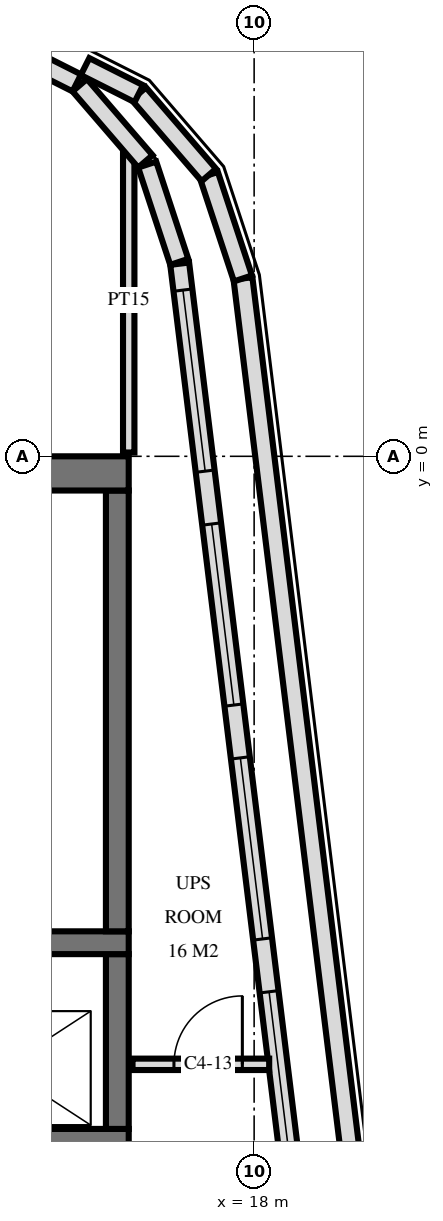
"""IFC4 building model, lengths in metres.
Left out: names, types, materials, properties, quantities, classifications, styles, units other than length and angle.
Written with IfcOpenShell. Run it as: python <this file> out.ifc"""

import sys

from ifc_helpers import new_model, si_unit, direction, frame, frame_2d, origin, place, context, subcontext, project, spatial, rectangle, extrude, element, fill, save


model = new_model("IFC4")
c1 = context("Model", 3, precision=1e-05, world=origin(), true_north=direction((0.0, 1.0)))
c2 = subcontext(c1, "Body", "Model", "MODEL_VIEW")
j1 = project(units=[si_unit("LENGTHUNIT", "METRE"), si_unit("PLANEANGLEUNIT", "RADIAN")], contexts=[c1])
p1 = place(None, origin())
s1 = spatial("IfcSite", under=j1, at=p1, CompositionType="ELEMENT")
p2 = place(p1, origin())
s2 = spatial("IfcBuilding", under=s1, at=p2, CompositionType="ELEMENT")
p3 = place(p2, frame((0.0, 0.0, 357.4)))
s3 = spatial("IfcBuildingStorey", under=s2, at=p3, CompositionType="ELEMENT", Elevation=357.4)
p4 = place(p3, frame((10.0, -0.225, 0.0), z_axis=(0.0, 0.0, 1.0), x_axis=(1.0, 0.0, 0.0)))
e1 = element("IfcWall", 1, at=p4, inside=s3, PredefinedType="SHEAR", context=c2, shape_type="SweptSolid", body=[
    extrude(rectangle(XDim=6.35, YDim=0.45, at=frame_2d((3.175, 0.0))), origin(), (0.0, 0.0, 1.0), 6.0),
])
p5 = place(p3, frame((16.2, -6.25, 0.0), z_axis=(0.0, 0.0, 1.0), x_axis=(0.0, 1.0, 0.0)))
e2 = element("IfcWall", 2, at=p5, inside=s3, PredefinedType="SHEAR", context=c2, shape_type="SweptSolid", body=[
    extrude(rectangle(XDim=5.8, YDim=0.3, at=frame_2d((2.9, 0.0))), origin(), (0.0, 0.0, 1.0), 6.0),
])
p6 = place(p3, frame((10.35, -9.0, 0.0), z_axis=(0.0, 0.0, 1.0), x_axis=(1.0, 0.0, 0.0)))
e3 = element("IfcWall", 3, at=p6, inside=s3, PredefinedType="SHEAR", context=c2, shape_type="SweptSolid", body=[
    extrude(rectangle(XDim=6.0, YDim=0.3, at=frame_2d((3.0, 0.0))), origin(), (0.0, 0.0, 1.0), 6.0),
])
p7 = place(p6, frame((3.8, 0.0, 0.0)))
e4 = element("IfcOpeningElement", 4, at=p7, cuts=e3, PredefinedType="OPENING", context=c2, shape_type="SweptSolid", body=[
    extrude(rectangle(XDim=1.1, YDim=2.1, at=frame_2d((0.55, 1.05))), frame((0.0, 0.16, 0.0), z_axis=(0.0, -1.0, 0.0), x_axis=(1.0, 0.0, 0.0)), (0.0, 0.0, 1.0), 0.32),
])
p8 = place(p3, frame((13.05, -6.4, 0.0), z_axis=(0.0, 0.0, 1.0), x_axis=(1.0, 0.0, 0.0)))
e5 = element("IfcWall", 5, at=p8, inside=s3, PredefinedType="SHEAR", context=c2, shape_type="SweptSolid", body=[
    extrude(rectangle(XDim=3.3, YDim=0.3, at=frame_2d((1.65, 0.0))), origin(), (0.0, 0.0, 1.0), 6.0),
])
p9 = place(p3, frame((16.2, -8.85, 0.0), z_axis=(0.0, 0.0, 1.0), x_axis=(0.0, 1.0, 0.0)))
e6 = element("IfcWall", 6, at=p9, inside=s3, PredefinedType="SHEAR", context=c2, shape_type="SweptSolid", body=[
    extrude(rectangle(XDim=2.3, YDim=0.3, at=frame_2d((1.15, 0.0))), origin(), (0.0, 0.0, 1.0), 6.0),
])
p10 = place(p3, frame((17.015, 2.558, 0.0), z_axis=(0.0, 0.0, 1.0), x_axis=(-0.313183064829, 0.949692775535, 0.0)))
e7 = element("IfcWall", 7, at=p10, inside=s3, PredefinedType="SOLIDWALL", context=c2, shape_type="SweptSolid", body=[
    extrude(rectangle(XDim=1.348, YDim=0.25, at=frame_2d((0.674, 0.0))), origin(), (0.0, 0.0, 1.0), 5.59),
])
p11 = place(p3, frame((16.569, 3.881, 0.0), z_axis=(0.0, 0.0, 1.0), x_axis=(-0.652735106061, 0.757586220384, 0.0)))
e8 = element("IfcWall", 8, at=p11, inside=s3, PredefinedType="SOLIDWALL", context=c2, shape_type="SweptSolid", body=[
    extrude(rectangle(XDim=1.323, YDim=0.25, at=frame_2d((0.661, 0.0))), origin(), (0.0, 0.0, 1.0), 5.59),
])
p12 = place(p3, frame((15.667, 4.913, 0.0), z_axis=(0.0, 0.0, 1.0), x_axis=(-0.893019948066, 0.450017080071, 0.0)))
e9 = element("IfcWall", 9, at=p12, inside=s3, PredefinedType="SOLIDWALL", context=c2, shape_type="SweptSolid", body=[
    extrude(rectangle(XDim=1.323, YDim=0.25, at=frame_2d((0.661, 0.0))), origin(), (0.0, 0.0, 1.0), 5.59),
])
p13 = place(p3, frame((18.91, -12.853, 0.0), z_axis=(0.0, 0.0, 1.0), x_axis=(-0.121859728622, 0.992547332141, 0.0)))
e10 = element("IfcWall", 10, at=p13, inside=s3, PredefinedType="SOLIDWALL", context=c2, shape_type="SweptSolid", body=[
    extrude(rectangle(XDim=15.503, YDim=0.25, at=frame_2d((7.751, 0.0))), origin(), (0.0, 0.0, 1.0), 5.59),
])
p14 = place(p13, frame((0.35, 0.0, 0.838)))
e11 = element("IfcOpeningElement", 11, at=p14, cuts=e10, PredefinedType="OPENING", context=c2, shape_type="SweptSolid", body=[
    extrude(rectangle(XDim=2.4, YDim=3.6, at=frame_2d((1.2, 1.8))), frame((0.0, 0.135, 0.0), z_axis=(0.0, -1.0, 0.0), x_axis=(1.0, 0.0, 0.0)), (0.0, 0.0, 1.0), 0.27),
])
p15 = place(p13, frame((3.451, 0.0, 0.838)))
e12 = element("IfcOpeningElement", 12, at=p15, cuts=e10, PredefinedType="OPENING", context=c2, shape_type="SweptSolid", body=[
    extrude(rectangle(XDim=2.4, YDim=3.6, at=frame_2d((1.2, 1.8))), frame((0.0, 0.135, 0.0), z_axis=(0.0, -1.0, 0.0), x_axis=(1.0, 0.0, 0.0)), (0.0, 0.0, 1.0), 0.27),
])
p16 = place(p13, frame((6.552, 0.0, 0.838)))
e13 = element("IfcOpeningElement", 13, at=p16, cuts=e10, PredefinedType="OPENING", context=c2, shape_type="SweptSolid", body=[
    extrude(rectangle(XDim=2.4, YDim=3.6, at=frame_2d((1.2, 1.8))), frame((0.0, 0.135, 0.0), z_axis=(0.0, -1.0, 0.0), x_axis=(1.0, 0.0, 0.0)), (0.0, 0.0, 1.0), 0.27),
])
p17 = place(p13, frame((9.652, 0.0, 0.838)))
e14 = element("IfcOpeningElement", 14, at=p17, cuts=e10, PredefinedType="OPENING", context=c2, shape_type="SweptSolid", body=[
    extrude(rectangle(XDim=2.4, YDim=3.6, at=frame_2d((1.2, 1.8))), frame((0.0, 0.135, 0.0), z_axis=(0.0, -1.0, 0.0), x_axis=(1.0, 0.0, 0.0)), (0.0, 0.0, 1.0), 0.27),
])
p18 = place(p13, frame((12.752, 0.0, 0.838)))
e15 = element("IfcOpeningElement", 15, at=p18, cuts=e10, PredefinedType="OPENING", context=c2, shape_type="SweptSolid", body=[
    extrude(rectangle(XDim=2.4, YDim=3.6, at=frame_2d((1.2, 1.8))), frame((0.0, 0.135, 0.0), z_axis=(0.0, -1.0, 0.0), x_axis=(1.0, 0.0, 0.0)), (0.0, 0.0, 1.0), 0.27),
])
p19 = place(p3, frame((15.775, 5.128, 0.0), z_axis=(0.0, 0.0, 1.0), x_axis=(0.893004738019, -0.450047261825, 0.0)))
e16 = element("IfcWall", 16, at=p19, inside=s3, PredefinedType="PARAPET", context=c2, shape_type="SweptSolid", body=[
    extrude(rectangle(XDim=0.792, YDim=0.25, at=frame_2d((0.396, 0.0))), origin(), (0.0, 0.0, 1.0), 1.1),
])
p20 = place(p3, frame((16.483, 4.771, 0.0), z_axis=(0.0, 0.0, 1.0), x_axis=(0.652669320099, -0.75764289649, 0.0)))
e17 = element("IfcWall", 17, at=p20, inside=s3, PredefinedType="PARAPET", context=c2, shape_type="SweptSolid", body=[
    extrude(rectangle(XDim=1.412, YDim=0.25, at=frame_2d((0.706, 0.0))), origin(), (0.0, 0.0, 1.0), 1.1),
])
p21 = place(p3, frame((17.404, 3.702, 0.0), z_axis=(0.0, 0.0, 1.0), x_axis=(0.313211571938, -0.949683374185, 0.0)))
e18 = element("IfcWall", 18, at=p21, inside=s3, PredefinedType="PARAPET", context=c2, shape_type="SweptSolid", body=[
    extrude(rectangle(XDim=1.433, YDim=0.25, at=frame_2d((0.717, 0.0))), origin(), (0.0, 0.0, 1.0), 1.1),
])
p22 = place(p3, frame((17.853, 2.341, 0.0), z_axis=(0.0, 0.0, 1.0), x_axis=(0.121860332662, -0.99254725798, 0.0)))
e19 = element("IfcWall", 19, at=p22, inside=s3, PredefinedType="PARAPET", context=c2, shape_type="SweptSolid", body=[
    extrude(rectangle(XDim=16.35, YDim=0.25, at=frame_2d((8.175, 0.0))), origin(), (0.0, 0.0, 1.0), 1.1),
])
p23 = place(p3, frame((16.35, 0.05, 0.0), z_axis=(0.0, 0.0, 1.0), x_axis=(0.0, 1.0, 0.0)))
e20 = element("IfcWall", 20, at=p23, inside=s3, PredefinedType="PARTITIONING", context=c2, shape_type="SweptSolid", body=[
    extrude(rectangle(XDim=4.001, YDim=0.15, at=frame_2d((2.0, 0.0))), origin(), (0.0, 0.0, 1.0), 5.72),
])
p24 = place(p3, frame((16.4, -8.0, 0.0), z_axis=(0.0, 0.0, 1.0), x_axis=(1.0, 0.0, 0.0)))
e21 = element("IfcWall", 21, at=p24, inside=s3, PredefinedType="PARTITIONING", context=c2, shape_type="SweptSolid", body=[
    extrude(rectangle(XDim=1.798, YDim=0.15, at=frame_2d((0.899, 0.0))), origin(), (0.0, 0.0, 1.0), 5.72),
])
p25 = place(p24, frame((0.545, 0.0, 0.0)))
e22 = element("IfcOpeningElement", 22, at=p25, cuts=e21, PredefinedType="OPENING", context=c2, shape_type="SweptSolid", body=[
    extrude(rectangle(XDim=0.9, YDim=2.1, at=frame_2d((0.45, 1.05))), frame((0.0, 0.085, 0.0), z_axis=(0.0, -1.0, 0.0), x_axis=(1.0, 0.0, 0.0)), (0.0, 0.0, 1.0), 0.17),
])
p26 = place(p15, origin())
e23 = element("IfcWindow", 23, at=p26, inside=s3, PartitioningType="SINGLE_PANEL", PredefinedType="USERDEFINED", context=c2, shape_type="SweptSolid", body=[
    extrude(rectangle(XDim=2.4, YDim=3.6, at=frame_2d((1.2, 1.8))), frame((0.0, 0.03, 0.0), z_axis=(0.0, -1.0, 0.0), x_axis=(1.0, 0.0, 0.0)), (0.0, 0.0, 1.0), 0.06),
])
fill(e12, e23)
p27 = place(p16, origin())
e24 = element("IfcWindow", 24, at=p27, inside=s3, PartitioningType="SINGLE_PANEL", PredefinedType="USERDEFINED", context=c2, shape_type="SweptSolid", body=[
    extrude(rectangle(XDim=2.4, YDim=3.6, at=frame_2d((1.2, 1.8))), frame((0.0, 0.03, 0.0), z_axis=(0.0, -1.0, 0.0), x_axis=(1.0, 0.0, 0.0)), (0.0, 0.0, 1.0), 0.06),
])
fill(e13, e24)
p28 = place(p17, origin())
e25 = element("IfcWindow", 25, at=p28, inside=s3, PartitioningType="SINGLE_PANEL", PredefinedType="USERDEFINED", context=c2, shape_type="SweptSolid", body=[
    extrude(rectangle(XDim=2.4, YDim=3.6, at=frame_2d((1.2, 1.8))), frame((0.0, 0.03, 0.0), z_axis=(0.0, -1.0, 0.0), x_axis=(1.0, 0.0, 0.0)), (0.0, 0.0, 1.0), 0.06),
])
fill(e14, e25)
p29 = place(p18, origin())
e26 = element("IfcWindow", 26, at=p29, inside=s3, PartitioningType="SINGLE_PANEL", PredefinedType="USERDEFINED", context=c2, shape_type="SweptSolid", body=[
    extrude(rectangle(XDim=2.4, YDim=3.6, at=frame_2d((1.2, 1.8))), frame((0.0, 0.03, 0.0), z_axis=(0.0, -1.0, 0.0), x_axis=(1.0, 0.0, 0.0)), (0.0, 0.0, 1.0), 0.06),
])
fill(e15, e26)
p30 = place(p25, origin())
e27 = element("IfcDoor", 27, at=p30, inside=s3, OperationType="SINGLE_SWING_LEFT", PredefinedType="DOOR", context=c2, shape_type="SweptSolid", body=[
    extrude(rectangle(XDim=0.9, YDim=2.1, at=frame_2d((0.45, 1.05))), frame((0.0, 0.025, 0.0), z_axis=(0.0, -1.0, 0.0), x_axis=(1.0, 0.0, 0.0)), (0.0, 0.0, 1.0), 0.05),
])
fill(e22, e27)
save(model, sys.argv[1])
